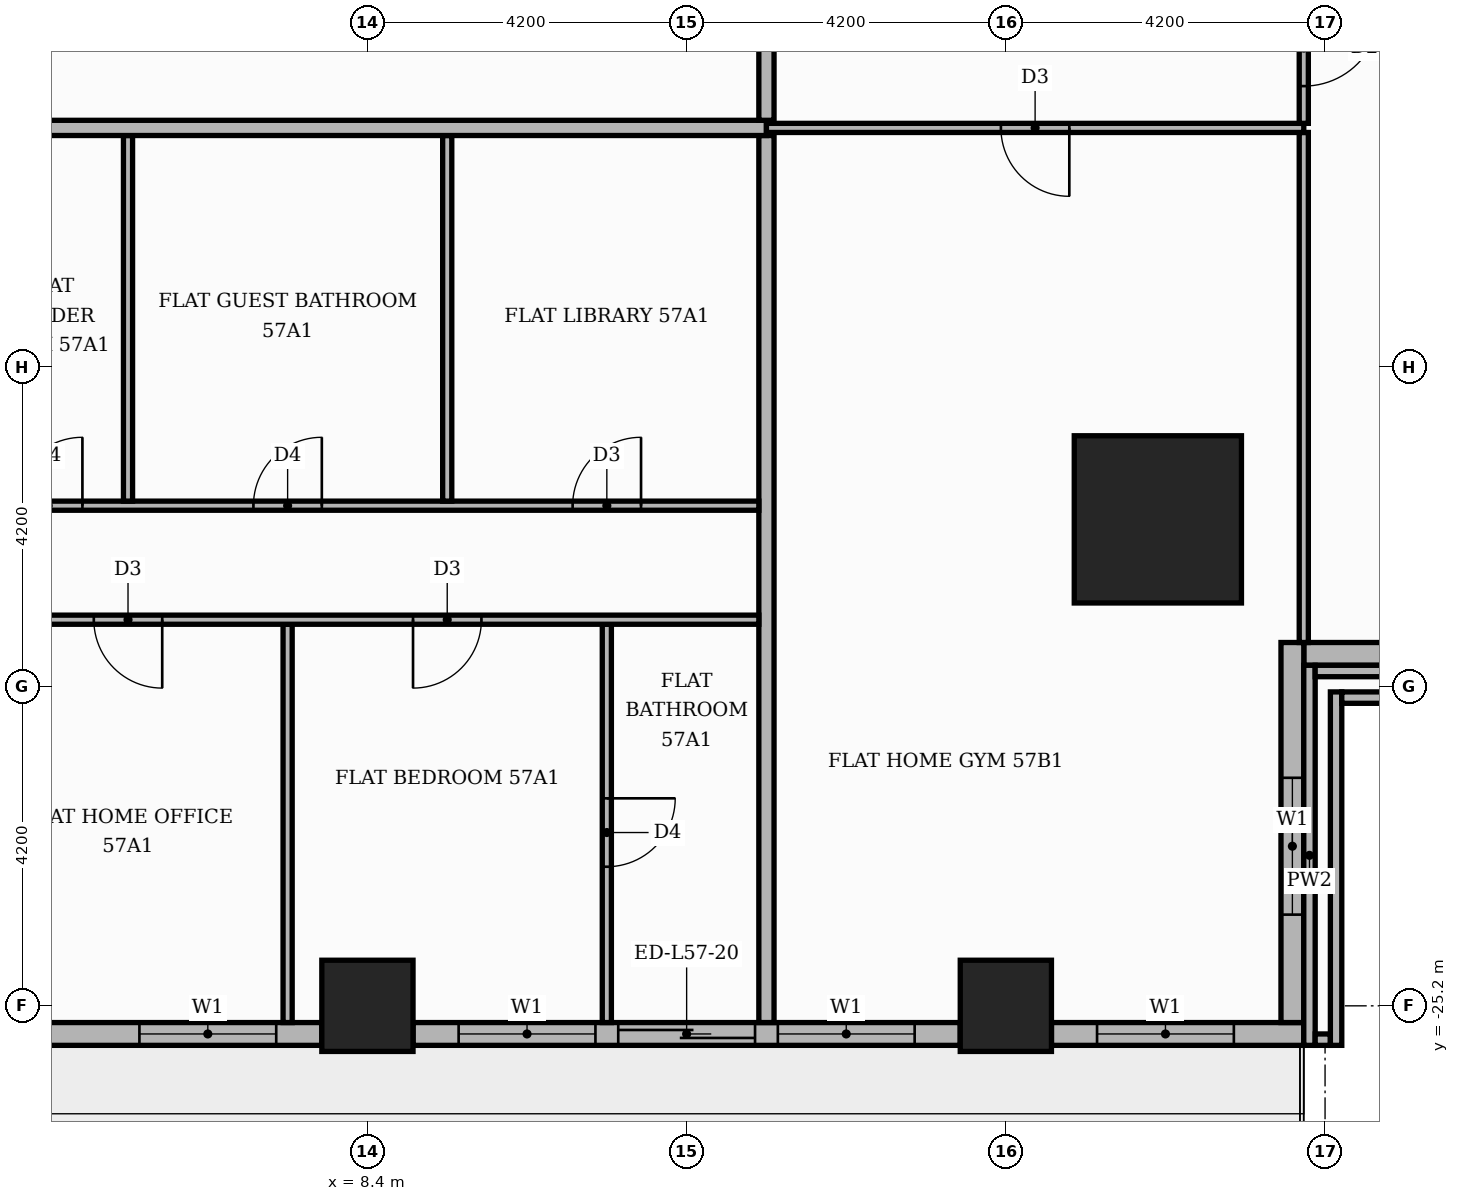
"""IFC4 building model, lengths in metres.
Left out: names, types, materials, properties, quantities, classifications, styles, units other than length and angle.
Written with IfcOpenShell. Run it as: python <this file> out.ifc"""

import sys

from ifc_helpers import new_model, si_unit, direction, frame, frame_2d, origin, origin_2d, place, context, subcontext, project, spatial, rectangle, extrude, element, fill, save


model = new_model("IFC4")
c1 = context("Model", 3, precision=1e-05, world=origin(), true_north=direction((0.0, 1.0)))
c2 = subcontext(c1, "Body", "Model", "MODEL_VIEW")
j1 = project(units=[si_unit("LENGTHUNIT", "METRE"), si_unit("PLANEANGLEUNIT", "RADIAN")], contexts=[c1])
p1 = place(None, origin())
s1 = spatial("IfcSite", under=j1, at=p1, CompositionType="ELEMENT")
p2 = place(p1, origin())
s2 = spatial("IfcBuilding", under=s1, at=p2, CompositionType="ELEMENT")
p3 = place(p2, frame((0.0, 0.0, 240.6)))
s3 = spatial("IfcBuildingStorey", under=s2, at=p3, CompositionType="ELEMENT", Elevation=240.6)
p4 = place(p3, frame((18.8, -18.8, 0.0), z_axis=(0.0, 0.0, 1.0), x_axis=(1.0, 0.0, 0.0)))
e1 = element("IfcColumn", 1, at=p4, inside=s3, PredefinedType="COLUMN", context=c2, shape_type="SweptSolid", body=[
    extrude(rectangle(XDim=2.2, YDim=2.2, at=origin_2d()), origin(), (0.0, 0.0, 1.0), 3.9),
])
for number, where, z_axis, x_axis in (
    (2, (8.4, -25.2, 0.0), (0.0, 0.0, 1.0), (1.0, 0.0, 0.0)),
    (3, (16.8, -25.2, 0.0), (0.0, 0.0, 1.0), (1.0, 0.0, 0.0)),
):
    element("IfcColumn", number, at=place(p3, frame(where, z_axis=z_axis, x_axis=x_axis)), inside=s3, PredefinedType="COLUMN", context=c2, shape_type="SweptSolid", body=[
        extrude(rectangle(XDim=1.2, YDim=1.2, at=origin_2d()), origin(), (0.0, 0.0, 1.0), 3.9),
    ])
p5 = place(p3, frame((20.72, -20.57, 0.0), z_axis=(0.0, 0.0, 1.0), x_axis=(1.0, 0.0, 0.0)))
e4 = element("IfcWall", 4, at=p5, inside=s3, PredefinedType="STANDARD", context=c2, shape_type="SweptSolid", body=[
    extrude(rectangle(XDim=5.0, YDim=0.3, at=frame_2d((2.5, 0.0))), origin(), (0.0, 0.0, 1.0), 3.48),
])
p6 = place(p5, frame((1.48, 0.0, 0.9)))
e5 = element("IfcOpeningElement", 5, at=p6, cuts=e4, PredefinedType="OPENING", context=c2, shape_type="SweptSolid", body=[
    extrude(rectangle(XDim=1.8, YDim=2.1, at=frame_2d((0.9, 1.05))), frame((0.0, 0.16, 0.0), z_axis=(0.0, -1.0, 0.0), x_axis=(1.0, 0.0, 0.0)), (0.0, 0.0, 1.0), 0.32),
])
p7 = place(p3, frame((3.45, -25.57, 0.0), z_axis=(0.0, 0.0, 1.0), x_axis=(1.0, 0.0, 0.0)))
e6 = element("IfcWall", 6, at=p7, inside=s3, PredefinedType="STANDARD", context=c2, shape_type="SweptSolid", body=[
    extrude(rectangle(XDim=4.35, YDim=0.3, at=frame_2d((2.175, 0.0))), origin(), (0.0, 0.0, 1.0), 3.48),
])
p8 = place(p7, frame((1.95, 0.0, 0.9)))
e7 = element("IfcOpeningElement", 7, at=p8, cuts=e6, PredefinedType="OPENING", context=c2, shape_type="SweptSolid", body=[
    extrude(rectangle(XDim=1.8, YDim=2.1, at=frame_2d((0.9, 1.05))), frame((0.0, 0.16, 0.0), z_axis=(0.0, -1.0, 0.0), x_axis=(1.0, 0.0, 0.0)), (0.0, 0.0, 1.0), 0.32),
])
p9 = place(p3, frame((9.0, -25.57, 0.0), z_axis=(0.0, 0.0, 1.0), x_axis=(1.0, 0.0, 0.0)))
e8 = element("IfcWall", 8, at=p9, inside=s3, PredefinedType="STANDARD", context=c2, shape_type="SweptSolid", body=[
    extrude(rectangle(XDim=7.2, YDim=0.3, at=frame_2d((3.6, 0.0))), origin(), (0.0, 0.0, 1.0), 3.48),
])
p10 = place(p9, frame((0.6, 0.0, 0.9)))
e9 = element("IfcOpeningElement", 9, at=p10, cuts=e8, PredefinedType="OPENING", context=c2, shape_type="SweptSolid", body=[
    extrude(rectangle(XDim=1.8, YDim=2.1, at=frame_2d((0.9, 1.05))), frame((0.0, 0.16, 0.0), z_axis=(0.0, -1.0, 0.0), x_axis=(1.0, 0.0, 0.0)), (0.0, 0.0, 1.0), 0.32),
])
p11 = place(p9, frame((2.7, 0.0, 0.0)))
e10 = element("IfcOpeningElement", 10, at=p11, cuts=e8, PredefinedType="OPENING", context=c2, shape_type="SweptSolid", body=[
    extrude(rectangle(XDim=1.8, YDim=2.4, at=frame_2d((0.9, 1.2))), frame((0.0, 0.16, 0.0), z_axis=(0.0, -1.0, 0.0), x_axis=(1.0, 0.0, 0.0)), (0.0, 0.0, 1.0), 0.32),
])
p12 = place(p9, frame((4.8, 0.0, 0.9)))
e11 = element("IfcOpeningElement", 11, at=p12, cuts=e8, PredefinedType="OPENING", context=c2, shape_type="SweptSolid", body=[
    extrude(rectangle(XDim=1.8, YDim=2.1, at=frame_2d((0.9, 1.05))), frame((0.0, 0.16, 0.0), z_axis=(0.0, -1.0, 0.0), x_axis=(1.0, 0.0, 0.0)), (0.0, 0.0, 1.0), 0.32),
])
p13 = place(p3, frame((17.4, -25.57, 0.0), z_axis=(0.0, 0.0, 1.0), x_axis=(1.0, 0.0, 0.0)))
e12 = element("IfcWall", 12, at=p13, inside=s3, PredefinedType="STANDARD", context=c2, shape_type="SweptSolid", body=[
    extrude(rectangle(XDim=3.32, YDim=0.3, at=frame_2d((1.66, 0.0))), origin(), (0.0, 0.0, 1.0), 3.48),
])
p14 = place(p13, frame((0.6, 0.0, 0.9)))
e13 = element("IfcOpeningElement", 13, at=p14, cuts=e12, PredefinedType="OPENING", context=c2, shape_type="SweptSolid", body=[
    extrude(rectangle(XDim=1.8, YDim=2.1, at=frame_2d((0.9, 1.05))), frame((0.0, 0.16, 0.0), z_axis=(0.0, -1.0, 0.0), x_axis=(1.0, 0.0, 0.0)), (0.0, 0.0, 1.0), 0.32),
])
p15 = place(p3, frame((20.57, -25.42, 0.0), z_axis=(0.0, 0.0, 1.0), x_axis=(0.0, 1.0, 0.0)))
e14 = element("IfcWall", 14, at=p15, inside=s3, PredefinedType="STANDARD", context=c2, shape_type="SweptSolid", body=[
    extrude(rectangle(XDim=5.0, YDim=0.3, at=frame_2d((2.5, 0.0))), origin(), (0.0, 0.0, 1.0), 3.48),
])
p16 = place(p15, frame((1.42, 0.0, 0.9)))
e15 = element("IfcOpeningElement", 15, at=p16, cuts=e14, PredefinedType="OPENING", context=c2, shape_type="SweptSolid", body=[
    extrude(rectangle(XDim=1.8, YDim=2.1, at=frame_2d((0.9, 1.05))), frame((0.0, 0.16, 0.0), z_axis=(0.0, -1.0, 0.0), x_axis=(1.0, 0.0, 0.0)), (0.0, 0.0, 1.0), 0.32),
])
p17 = place(p3, frame((20.795, -25.72, 0.0), z_axis=(0.0, 0.0, 1.0), x_axis=(0.0, 1.0, 0.0)))
e16 = element("IfcWall", 16, at=p17, inside=s3, PredefinedType="PARAPET", context=c2, shape_type="SweptSolid", body=[
    extrude(rectangle(XDim=5.0, YDim=0.15, at=frame_2d((2.5, 0.0))), origin(), (0.0, 0.0, 1.0), 1.1),
])
p18 = place(p3, frame((20.87, -25.645, 0.0), z_axis=(0.0, 0.0, 1.0), x_axis=(1.0, 0.0, 0.0)))
e17 = element("IfcWall", 17, at=p18, inside=s3, PredefinedType="PARAPET", context=c2, shape_type="SweptSolid", body=[
    extrude(rectangle(XDim=0.2, YDim=0.15, at=frame_2d((0.1, 0.0))), origin(), (0.0, 0.0, 1.0), 1.1),
])
p19 = place(p3, frame((20.87, -20.795, 0.0), z_axis=(0.0, 0.0, 1.0), x_axis=(1.0, 0.0, 0.0)))
e18 = element("IfcWall", 18, at=p19, inside=s3, PredefinedType="PARAPET", context=c2, shape_type="SweptSolid", body=[
    extrude(rectangle(XDim=4.7, YDim=0.15, at=frame_2d((2.35, 0.0))), origin(), (0.0, 0.0, 1.0), 1.1),
])
p20 = place(p3, frame((21.145, -25.72, 0.0), z_axis=(0.0, 0.0, 1.0), x_axis=(0.0, 1.0, 0.0)))
e19 = element("IfcWall", 19, at=p20, inside=s3, PredefinedType="PARAPET", context=c2, shape_type="SweptSolid", body=[
    extrude(rectangle(XDim=4.65, YDim=0.15, at=frame_2d((2.325, 0.0))), origin(), (0.0, 0.0, 1.0), 1.1),
])
p21 = place(p3, frame((21.22, -21.145, 0.0), z_axis=(0.0, 0.0, 1.0), x_axis=(1.0, 0.0, 0.0)))
e20 = element("IfcWall", 20, at=p21, inside=s3, PredefinedType="PARAPET", context=c2, shape_type="SweptSolid", body=[
    extrude(rectangle(XDim=4.35, YDim=0.15, at=frame_2d((2.175, 0.0))), origin(), (0.0, 0.0, 1.0), 1.1),
])
p22 = place(p3, frame((7.35, -25.42, 0.0), z_axis=(0.0, 0.0, 1.0), x_axis=(0.0, 1.0, 0.0)))
e21 = element("IfcWall", 21, at=p22, inside=s3, PredefinedType="PARTITIONING", context=c2, shape_type="SweptSolid", body=[
    extrude(rectangle(XDim=5.24, YDim=0.12, at=frame_2d((2.62, 0.0))), origin(), (0.0, 0.0, 1.0), 3.48),
])
p23 = place(p3, frame((11.55, -25.42, 0.0), z_axis=(0.0, 0.0, 1.0), x_axis=(0.0, 1.0, 0.0)))
e22 = element("IfcWall", 22, at=p23, inside=s3, PredefinedType="PARTITIONING", context=c2, shape_type="SweptSolid", body=[
    extrude(rectangle(XDim=5.24, YDim=0.12, at=frame_2d((2.62, 0.0))), origin(), (0.0, 0.0, 1.0), 3.48),
])
p24 = place(p23, frame((2.05, 0.0, 0.0)))
e23 = element("IfcOpeningElement", 23, at=p24, cuts=e22, PredefinedType="OPENING", context=c2, shape_type="SweptSolid", body=[
    extrude(rectangle(XDim=0.9, YDim=2.1, at=frame_2d((0.45, 1.05))), frame((0.0, 0.07, 0.0), z_axis=(0.0, -1.0, 0.0), x_axis=(1.0, 0.0, 0.0)), (0.0, 0.0, 1.0), 0.14),
])
p25 = place(p3, frame((13.65, -25.42, 0.0), z_axis=(0.0, 0.0, 1.0), x_axis=(0.0, 1.0, 0.0)))
e24 = element("IfcWall", 24, at=p25, inside=s3, PredefinedType="PARTITIONING", context=c2, shape_type="SweptSolid", body=[
    extrude(rectangle(XDim=11.67, YDim=0.2, at=frame_2d((5.835, 0.0))), origin(), (0.0, 0.0, 1.0), 3.48),
])
p26 = place(p3, frame((20.72, -20.42, 0.0), z_axis=(0.0, 0.0, 1.0), x_axis=(0.0, 1.0, 0.0)))
e25 = element("IfcWall", 25, at=p26, inside=s3, PredefinedType="PARTITIONING", context=c2, shape_type="SweptSolid", body=[
    extrude(rectangle(XDim=6.71, YDim=0.12, at=frame_2d((3.355, 0.0))), origin(), (0.0, 0.0, 1.0), 3.48),
])
p27 = place(p3, frame((3.15, -20.12, 0.0), z_axis=(0.0, 0.0, 1.0), x_axis=(1.0, 0.0, 0.0)))
e26 = element("IfcWall", 26, at=p27, inside=s3, PredefinedType="PARTITIONING", context=c2, shape_type="SweptSolid", body=[
    extrude(rectangle(XDim=10.4, YDim=0.12, at=frame_2d((5.2, 0.0))), origin(), (0.0, 0.0, 1.0), 3.48),
])
p28 = place(p27, frame((1.65, 0.0, 0.0)))
e27 = element("IfcOpeningElement", 27, at=p28, cuts=e26, PredefinedType="OPENING", context=c2, shape_type="SweptSolid", body=[
    extrude(rectangle(XDim=0.9, YDim=2.1, at=frame_2d((0.45, 1.05))), frame((0.0, 0.07, 0.0), z_axis=(0.0, -1.0, 0.0), x_axis=(1.0, 0.0, 0.0)), (0.0, 0.0, 1.0), 0.14),
])
p29 = place(p27, frame((5.85, 0.0, 0.0)))
e28 = element("IfcOpeningElement", 28, at=p29, cuts=e26, PredefinedType="OPENING", context=c2, shape_type="SweptSolid", body=[
    extrude(rectangle(XDim=0.9, YDim=2.1, at=frame_2d((0.45, 1.05))), frame((0.0, 0.07, 0.0), z_axis=(0.0, -1.0, 0.0), x_axis=(1.0, 0.0, 0.0)), (0.0, 0.0, 1.0), 0.14),
])
p30 = place(p3, frame((-9.45, -18.62, 0.0), z_axis=(0.0, 0.0, 1.0), x_axis=(1.0, 0.0, 0.0)))
e29 = element("IfcWall", 29, at=p30, inside=s3, PredefinedType="PARTITIONING", context=c2, shape_type="SweptSolid", body=[
    extrude(rectangle(XDim=23.0, YDim=0.12, at=frame_2d((11.5, 0.0))), origin(), (0.0, 0.0, 1.0), 3.48),
])
p31 = place(p30, frame((2.7, 0.0, 0.0)))
e30 = element("IfcOpeningElement", 30, at=p31, cuts=e29, PredefinedType="OPENING", context=c2, shape_type="SweptSolid", body=[
    extrude(rectangle(XDim=0.9, YDim=2.1, at=frame_2d((0.45, 1.05))), frame((0.0, 0.07, 0.0), z_axis=(0.0, -1.0, 0.0), x_axis=(1.0, 0.0, 0.0)), (0.0, 0.0, 1.0), 0.14),
])
p32 = place(p30, frame((9.0, 0.0, 0.0)))
e31 = element("IfcOpeningElement", 31, at=p32, cuts=e29, PredefinedType="OPENING", context=c2, shape_type="SweptSolid", body=[
    extrude(rectangle(XDim=0.9, YDim=2.1, at=frame_2d((0.45, 1.05))), frame((0.0, 0.07, 0.0), z_axis=(0.0, -1.0, 0.0), x_axis=(1.0, 0.0, 0.0)), (0.0, 0.0, 1.0), 0.14),
])
p33 = place(p30, frame((13.2, 0.0, 0.0)))
e32 = element("IfcOpeningElement", 32, at=p33, cuts=e29, PredefinedType="OPENING", context=c2, shape_type="SweptSolid", body=[
    extrude(rectangle(XDim=0.9, YDim=2.1, at=frame_2d((0.45, 1.05))), frame((0.0, 0.07, 0.0), z_axis=(0.0, -1.0, 0.0), x_axis=(1.0, 0.0, 0.0)), (0.0, 0.0, 1.0), 0.14),
])
p34 = place(p30, frame((16.35, 0.0, 0.0)))
e33 = element("IfcOpeningElement", 33, at=p34, cuts=e29, PredefinedType="OPENING", context=c2, shape_type="SweptSolid", body=[
    extrude(rectangle(XDim=0.9, YDim=2.1, at=frame_2d((0.45, 1.05))), frame((0.0, 0.07, 0.0), z_axis=(0.0, -1.0, 0.0), x_axis=(1.0, 0.0, 0.0)), (0.0, 0.0, 1.0), 0.14),
])
p35 = place(p30, frame((20.55, 0.0, 0.0)))
e34 = element("IfcOpeningElement", 34, at=p35, cuts=e29, PredefinedType="OPENING", context=c2, shape_type="SweptSolid", body=[
    extrude(rectangle(XDim=0.9, YDim=2.1, at=frame_2d((0.45, 1.05))), frame((0.0, 0.07, 0.0), z_axis=(0.0, -1.0, 0.0), x_axis=(1.0, 0.0, 0.0)), (0.0, 0.0, 1.0), 0.14),
])
for number, where, z_axis, x_axis in (
    (35, (5.25, -18.56, 0.0), (0.0, 0.0, 1.0), (0.0, 1.0, 0.0)),
    (36, (9.45, -18.56, 0.0), (0.0, 0.0, 1.0), (0.0, 1.0, 0.0)),
):
    element("IfcWall", number, at=place(p3, frame(where, z_axis=z_axis, x_axis=x_axis)), inside=s3, PredefinedType="PARTITIONING", context=c2, shape_type="SweptSolid", body=[
        extrude(rectangle(XDim=4.81, YDim=0.12, at=frame_2d((2.405, 0.0))), origin(), (0.0, 0.0, 1.0), 3.48),
    ])
p36 = place(p3, frame((-25.42, -13.65, 0.0), z_axis=(0.0, 0.0, 1.0), x_axis=(1.0, 0.0, 0.0)))
e37 = element("IfcWall", 37, at=p36, inside=s3, PredefinedType="PARTITIONING", context=c2, shape_type="SweptSolid", body=[
    extrude(rectangle(XDim=39.07, YDim=0.2, at=frame_2d((19.535, 0.0))), origin(), (0.0, 0.0, 1.0), 3.48),
])
p37 = place(p36, frame((13.32, 0.0, 0.0)))
e38 = element("IfcOpeningElement", 38, at=p37, cuts=e37, PredefinedType="OPENING", context=c2, shape_type="SweptSolid", body=[
    extrude(rectangle(XDim=1.1, YDim=2.4, at=frame_2d((0.55, 1.2))), frame((0.0, 0.11, 0.0), z_axis=(0.0, -1.0, 0.0), x_axis=(1.0, 0.0, 0.0)), (0.0, 0.0, 1.0), 0.22),
])
p38 = place(p3, frame((13.65, -13.65, 0.0), z_axis=(0.0, 0.0, 1.0), x_axis=(1.0, 0.0, 0.0)))
e39 = element("IfcWall", 39, at=p38, inside=s3, PredefinedType="PARTITIONING", context=c2, shape_type="SweptSolid", body=[
    extrude(rectangle(XDim=7.07, YDim=0.12, at=frame_2d((3.535, 0.0))), origin(), (0.0, 0.0, 1.0), 3.48),
])
p39 = place(p38, frame((3.085, 0.0, 0.0)))
e40 = element("IfcOpeningElement", 40, at=p39, cuts=e39, PredefinedType="OPENING", context=c2, shape_type="SweptSolid", body=[
    extrude(rectangle(XDim=0.9, YDim=2.1, at=frame_2d((0.45, 1.05))), frame((0.0, 0.07, 0.0), z_axis=(0.0, -1.0, 0.0), x_axis=(1.0, 0.0, 0.0)), (0.0, 0.0, 1.0), 0.14),
])
p40 = place(p3, frame((20.72, -13.59, 0.0), z_axis=(0.0, 0.0, 1.0), x_axis=(0.0, 1.0, 0.0)))
e41 = element("IfcWall", 41, at=p40, inside=s3, PredefinedType="PARTITIONING", context=c2, shape_type="SweptSolid", body=[
    extrude(rectangle(XDim=1.98, YDim=0.12, at=frame_2d((0.99, 0.0))), origin(), (0.0, 0.0, 1.0), 3.48),
])
p41 = place(p40, frame((0.49, 0.0, 0.0)))
e42 = element("IfcOpeningElement", 42, at=p41, cuts=e41, PredefinedType="OPENING", context=c2, shape_type="SweptSolid", body=[
    extrude(rectangle(XDim=1.0, YDim=2.1, at=frame_2d((0.5, 1.05))), frame((0.0, 0.07, 0.0), z_axis=(0.0, -1.0, 0.0), x_axis=(1.0, 0.0, 0.0)), (0.0, 0.0, 1.0), 0.14),
])
p42 = place(p3, frame((13.65, -13.55, 0.0), z_axis=(0.0, 0.0, 1.0), x_axis=(0.0, 1.0, 0.0)))
e43 = element("IfcWall", 43, at=p42, inside=s3, PredefinedType="PARTITIONING", context=c2, shape_type="SweptSolid", body=[
    extrude(rectangle(XDim=2.45, YDim=0.2, at=frame_2d((1.225, 0.0))), origin(), (0.0, 0.0, 1.0), 3.48),
])
p43 = place(p8, origin())
e44 = element("IfcWindow", 44, at=p43, inside=s3, PartitioningType="SINGLE_PANEL", PredefinedType="WINDOW", context=c2, shape_type="SweptSolid", body=[
    extrude(rectangle(XDim=1.8, YDim=2.1, at=frame_2d((0.9, 1.05))), frame((0.0, 0.03, 0.0), z_axis=(0.0, -1.0, 0.0), x_axis=(1.0, 0.0, 0.0)), (0.0, 0.0, 1.0), 0.06),
])
fill(e7, e44)
p44 = place(p10, origin())
e45 = element("IfcWindow", 45, at=p44, inside=s3, PartitioningType="SINGLE_PANEL", PredefinedType="WINDOW", context=c2, shape_type="SweptSolid", body=[
    extrude(rectangle(XDim=1.8, YDim=2.1, at=frame_2d((0.9, 1.05))), frame((0.0, 0.03, 0.0), z_axis=(0.0, -1.0, 0.0), x_axis=(1.0, 0.0, 0.0)), (0.0, 0.0, 1.0), 0.06),
])
fill(e9, e45)
p45 = place(p11, origin())
e46 = element("IfcDoor", 46, at=p45, inside=s3, OperationType="SLIDING_TO_RIGHT", PredefinedType="DOOR", context=c2, shape_type="SweptSolid", body=[
    extrude(rectangle(XDim=1.8, YDim=2.4, at=frame_2d((0.9, 1.2))), frame((0.0, 0.025, 0.0), z_axis=(0.0, -1.0, 0.0), x_axis=(1.0, 0.0, 0.0)), (0.0, 0.0, 1.0), 0.05),
])
fill(e10, e46)
p46 = place(p12, origin())
e47 = element("IfcWindow", 47, at=p46, inside=s3, PartitioningType="SINGLE_PANEL", PredefinedType="WINDOW", context=c2, shape_type="SweptSolid", body=[
    extrude(rectangle(XDim=1.8, YDim=2.1, at=frame_2d((0.9, 1.05))), frame((0.0, 0.03, 0.0), z_axis=(0.0, -1.0, 0.0), x_axis=(1.0, 0.0, 0.0)), (0.0, 0.0, 1.0), 0.06),
])
fill(e11, e47)
p47 = place(p14, origin())
e48 = element("IfcWindow", 48, at=p47, inside=s3, PartitioningType="SINGLE_PANEL", PredefinedType="WINDOW", context=c2, shape_type="SweptSolid", body=[
    extrude(rectangle(XDim=1.8, YDim=2.1, at=frame_2d((0.9, 1.05))), frame((0.0, 0.03, 0.0), z_axis=(0.0, -1.0, 0.0), x_axis=(1.0, 0.0, 0.0)), (0.0, 0.0, 1.0), 0.06),
])
fill(e13, e48)
p48 = place(p16, origin())
e49 = element("IfcWindow", 49, at=p48, inside=s3, PartitioningType="SINGLE_PANEL", PredefinedType="WINDOW", context=c2, shape_type="SweptSolid", body=[
    extrude(rectangle(XDim=1.8, YDim=2.1, at=frame_2d((0.9, 1.05))), frame((0.0, 0.03, 0.0), z_axis=(0.0, -1.0, 0.0), x_axis=(1.0, 0.0, 0.0)), (0.0, 0.0, 1.0), 0.06),
])
fill(e15, e49)
p49 = place(p33, origin())
e50 = element("IfcDoor", 50, at=p49, inside=s3, OperationType="SINGLE_SWING_RIGHT", PredefinedType="DOOR", context=c2, shape_type="SweptSolid", body=[
    extrude(rectangle(XDim=0.9, YDim=2.1, at=frame_2d((0.45, 1.05))), frame((0.0, 0.025, 0.0), z_axis=(0.0, -1.0, 0.0), x_axis=(1.0, 0.0, 0.0)), (0.0, 0.0, 1.0), 0.05),
])
fill(e32, e50)
p50 = place(p34, origin())
e51 = element("IfcDoor", 51, at=p50, inside=s3, OperationType="SINGLE_SWING_RIGHT", PredefinedType="DOOR", context=c2, shape_type="SweptSolid", body=[
    extrude(rectangle(XDim=0.9, YDim=2.1, at=frame_2d((0.45, 1.05))), frame((0.0, 0.025, 0.0), z_axis=(0.0, -1.0, 0.0), x_axis=(1.0, 0.0, 0.0)), (0.0, 0.0, 1.0), 0.05),
])
fill(e33, e51)
p51 = place(p35, origin())
e52 = element("IfcDoor", 52, at=p51, inside=s3, OperationType="SINGLE_SWING_RIGHT", PredefinedType="DOOR", context=c2, shape_type="SweptSolid", body=[
    extrude(rectangle(XDim=0.9, YDim=2.1, at=frame_2d((0.45, 1.05))), frame((0.0, 0.025, 0.0), z_axis=(0.0, -1.0, 0.0), x_axis=(1.0, 0.0, 0.0)), (0.0, 0.0, 1.0), 0.05),
])
fill(e34, e52)
p52 = place(p28, frame((0.9, 0.0, 0.0), z_axis=(0.0, 0.0, 1.0), x_axis=(-1.0, 0.0, 0.0)))
e53 = element("IfcDoor", 53, at=p52, inside=s3, OperationType="SINGLE_SWING_RIGHT", PredefinedType="DOOR", context=c2, shape_type="SweptSolid", body=[
    extrude(rectangle(XDim=0.9, YDim=2.1, at=frame_2d((0.45, 1.05))), frame((0.0, 0.025, 0.0), z_axis=(0.0, -1.0, 0.0), x_axis=(1.0, 0.0, 0.0)), (0.0, 0.0, 1.0), 0.05),
])
fill(e27, e53)
p53 = place(p29, frame((0.9, 0.0, 0.0), z_axis=(0.0, 0.0, 1.0), x_axis=(-1.0, 0.0, 0.0)))
e54 = element("IfcDoor", 54, at=p53, inside=s3, OperationType="SINGLE_SWING_LEFT", PredefinedType="DOOR", context=c2, shape_type="SweptSolid", body=[
    extrude(rectangle(XDim=0.9, YDim=2.1, at=frame_2d((0.45, 1.05))), frame((0.0, 0.025, 0.0), z_axis=(0.0, -1.0, 0.0), x_axis=(1.0, 0.0, 0.0)), (0.0, 0.0, 1.0), 0.05),
])
fill(e28, e54)
p54 = place(p24, frame((0.9, 0.0, 0.0), z_axis=(0.0, 0.0, 1.0), x_axis=(-1.0, 0.0, 0.0)))
e55 = element("IfcDoor", 55, at=p54, inside=s3, OperationType="SINGLE_SWING_RIGHT", PredefinedType="DOOR", context=c2, shape_type="SweptSolid", body=[
    extrude(rectangle(XDim=0.9, YDim=2.1, at=frame_2d((0.45, 1.05))), frame((0.0, 0.025, 0.0), z_axis=(0.0, -1.0, 0.0), x_axis=(1.0, 0.0, 0.0)), (0.0, 0.0, 1.0), 0.05),
])
fill(e23, e55)
p55 = place(p39, frame((0.9, 0.0, 0.0), z_axis=(0.0, 0.0, 1.0), x_axis=(-1.0, 0.0, 0.0)))
e56 = element("IfcDoor", 56, at=p55, inside=s3, OperationType="SINGLE_SWING_RIGHT", PredefinedType="DOOR", context=c2, shape_type="SweptSolid", body=[
    extrude(rectangle(XDim=0.9, YDim=2.1, at=frame_2d((0.45, 1.05))), frame((0.0, 0.025, 0.0), z_axis=(0.0, -1.0, 0.0), x_axis=(1.0, 0.0, 0.0)), (0.0, 0.0, 1.0), 0.05),
])
fill(e40, e56)
p56 = place(p41, frame((1.0, 0.0, 0.0), z_axis=(0.0, 0.0, 1.0), x_axis=(-1.0, 0.0, 0.0)))
e57 = element("IfcDoor", 57, at=p56, inside=s3, OperationType="SINGLE_SWING_RIGHT", PredefinedType="DOOR", context=c2, shape_type="SweptSolid", body=[
    extrude(rectangle(XDim=1.0, YDim=2.1, at=frame_2d((0.5, 1.05))), frame((0.0, 0.025, 0.0), z_axis=(0.0, -1.0, 0.0), x_axis=(1.0, 0.0, 0.0)), (0.0, 0.0, 1.0), 0.05),
])
fill(e42, e57)
save(model, sys.argv[1])
